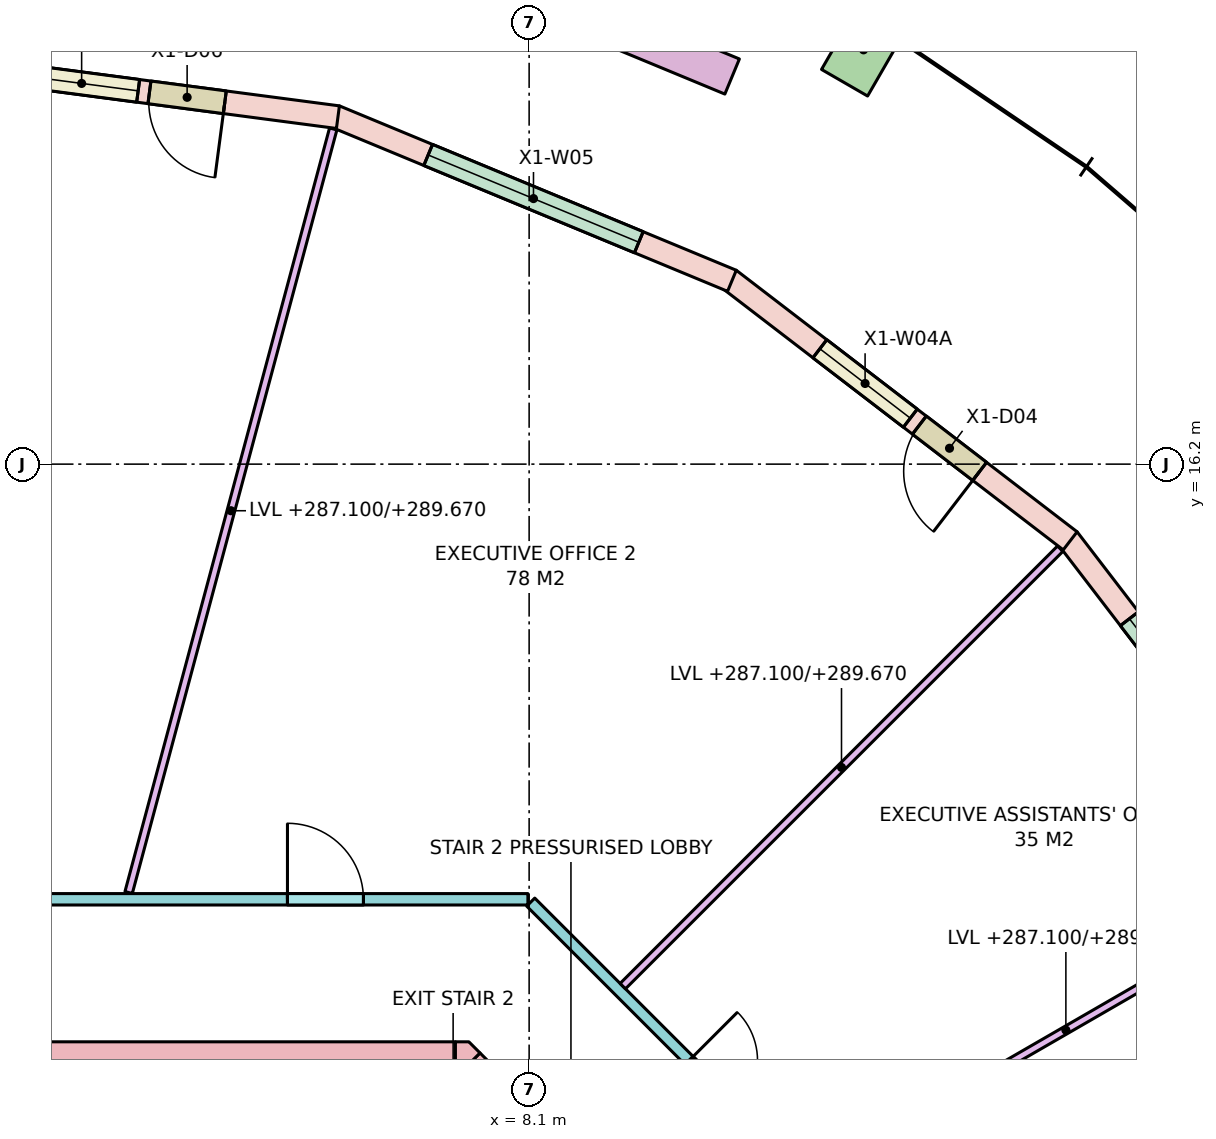
"""IFC4 building model, lengths in metres.
Left out: names, types, materials, properties, quantities, classifications, styles, units other than length and angle.
Written with IfcOpenShell. Run it as: python <this file> out.ifc"""

import sys

from ifc_helpers import new_model, si_unit, direction, frame, frame_2d, origin, origin_2d, place, context, subcontext, project, spatial, polyline, rectangle, outline, extrude, element, fill, save


model = new_model("IFC4")
c1 = context("Model", 3, precision=1e-05, world=origin(), true_north=direction((0.0, 1.0)))
c2 = subcontext(c1, "Body", "Model", "MODEL_VIEW")
j1 = project(units=[si_unit("LENGTHUNIT", "METRE"), si_unit("PLANEANGLEUNIT", "RADIAN")], contexts=[c1])
p1 = place(None, origin())
s1 = spatial("IfcSite", under=j1, at=p1, CompositionType="ELEMENT")
p2 = place(p1, origin())
s2 = spatial("IfcBuilding", under=s1, at=p2, CompositionType="ELEMENT")
p3 = place(p2, frame((0.0, 0.0, 287.1)))
s3 = spatial("IfcBuildingStorey", under=s2, at=p3, CompositionType="ELEMENT", Elevation=287.1)
p4 = place(p3, frame((12.5, 21.651, 0.0), z_axis=(0.0, 0.0, 1.0), x_axis=(-0.866025403784, 0.5, 0.0)))
e1 = element("IfcColumn", 1, at=p4, inside=s3, PredefinedType="COLUMN", context=c2, shape_type="SweptSolid", body=[
    extrude(rectangle(XDim=0.7, YDim=1.0, at=origin_2d()), origin(), (0.0, 0.0, 1.0), 3.7),
])
p5 = place(p3, frame((-7.13, 8.35, -0.28), z_axis=(0.0, 0.0, 1.0), x_axis=(1.0, 0.0, 0.0)))
e2 = element("IfcWall", 2, at=p5, inside=s3, PredefinedType="SHEAR", context=c2, shape_type="SweptSolid", body=[
    extrude(rectangle(XDim=14.26, YDim=0.5, at=frame_2d((7.13, 0.0))), origin(), (0.0, 0.0, 1.0), 3.7),
])
p6 = place(p5, frame((5.48, 0.0, 0.28)))
e3 = element("IfcOpeningElement", 3, at=p6, cuts=e2, PredefinedType="OPENING", context=c2, shape_type="SweptSolid", body=[
    extrude(rectangle(XDim=0.7, YDim=2.1, at=frame_2d((0.35, 1.05))), frame((0.0, 0.26, 0.0), z_axis=(0.0, -1.0, 0.0), x_axis=(1.0, 0.0, 0.0)), (0.0, 0.0, 1.0), 0.52),
])
p7 = place(p5, frame((7.155, 0.0, 0.28)))
e4 = element("IfcOpeningElement", 4, at=p7, cuts=e2, PredefinedType="OPENING", context=c2, shape_type="SweptSolid", body=[
    extrude(rectangle(XDim=0.9, YDim=2.1, at=frame_2d((0.45, 1.05))), frame((0.0, 0.26, 0.0), z_axis=(0.0, -1.0, 0.0), x_axis=(1.0, 0.0, 0.0)), (0.0, 0.0, 1.0), 0.52),
])
p8 = place(p3, frame((7.277, 8.277, -0.28), z_axis=(0.0, 0.0, 1.0), x_axis=(0.707106781187, -0.707106781187, 0.0)))
e5 = element("IfcWall", 5, at=p8, inside=s3, PredefinedType="SHEAR", context=c2, shape_type="SweptSolid", body=[
    extrude(rectangle(XDim=4.243, YDim=0.5, at=frame_2d((2.121, 0.0))), origin(), (0.0, 0.0, 1.0), 3.7),
])
p9 = place(p8, frame((2.393, 0.0, 0.28)))
e6 = element("IfcOpeningElement", 6, at=p9, cuts=e5, PredefinedType="OPENING", context=c2, shape_type="SweptSolid", body=[
    extrude(rectangle(XDim=1.2, YDim=2.1, at=frame_2d((0.6, 1.05))), frame((0.0, 0.26, 0.0), z_axis=(0.0, -1.0, 0.0), x_axis=(1.0, 0.0, 0.0)), (0.0, 0.0, 1.0), 0.52),
])
p10 = place(p3, frame((0.0, 0.0, -0.28)))
e7 = element("IfcWall", 7, at=p10, inside=s3, PredefinedType="SHEAR", context=c2, shape_type="SweptSolid", body=[
    extrude(outline(polyline([(7.307, 8.6), (7.454, 8.454), (7.13, 8.13), (7.13, 8.6), (7.307, 8.6)])), origin(), (0.0, 0.0, 1.0), 3.7),
])
p11 = place(p3, frame((18.632, 10.734, 0.0), z_axis=(0.0, 0.0, 1.0), x_axis=(-0.608747976925, 0.793363662257, 0.0)))
e8 = element("IfcWall", 8, at=p11, inside=s3, PredefinedType="STANDARD", context=c2, shape_type="SweptSolid", body=[
    extrude(rectangle(XDim=5.652, YDim=0.3, at=frame_2d((2.826, 0.0))), origin(), (0.0, 0.0, 1.0), 3.42),
])
p12 = place(p11, frame((1.326, 0.0, 0.8)))
e9 = element("IfcOpeningElement", 9, at=p12, cuts=e8, PredefinedType="OPENING", context=c2, shape_type="SweptSolid", body=[
    extrude(rectangle(XDim=3.0, YDim=2.4, at=frame_2d((1.5, 1.2))), frame((0.0, 0.16, 0.0), z_axis=(0.0, -1.0, 0.0), x_axis=(1.0, 0.0, 0.0)), (0.0, 0.0, 1.0), 0.32),
])
p13 = place(p3, frame((15.219, 15.191, 0.0), z_axis=(0.0, 0.0, 1.0), x_axis=(-0.793363662257, 0.608747976925, 0.0)))
e10 = element("IfcWall", 10, at=p13, inside=s3, PredefinedType="STANDARD", context=c2, shape_type="SweptSolid", body=[
    extrude(rectangle(XDim=5.652, YDim=0.3, at=frame_2d((2.826, 0.0))), origin(), (0.0, 0.0, 1.0), 3.42),
])
p14 = place(p13, frame((1.501, 0.0, 0.0)))
e11 = element("IfcOpeningElement", 11, at=p14, cuts=e10, PredefinedType="OPENING", context=c2, shape_type="SweptSolid", body=[
    extrude(rectangle(XDim=1.0, YDim=2.4, at=frame_2d((0.5, 1.2))), frame((0.0, 0.16, 0.0), z_axis=(0.0, -1.0, 0.0), x_axis=(1.0, 0.0, 0.0)), (0.0, 0.0, 1.0), 0.32),
])
p15 = place(p13, frame((2.651, 0.0, 0.8)))
e12 = element("IfcOpeningElement", 12, at=p15, cuts=e10, PredefinedType="OPENING", context=c2, shape_type="SweptSolid", body=[
    extrude(rectangle(XDim=1.5, YDim=2.4, at=frame_2d((0.75, 1.2))), frame((0.0, 0.16, 0.0), z_axis=(0.0, -1.0, 0.0), x_axis=(1.0, 0.0, 0.0)), (0.0, 0.0, 1.0), 0.32),
])
p16 = place(p3, frame((10.768, 18.612, 0.0), z_axis=(0.0, 0.0, 1.0), x_axis=(-0.923888907244, 0.382660798975, 0.0)))
e13 = element("IfcWall", 13, at=p16, inside=s3, PredefinedType="STANDARD", context=c2, shape_type="SweptSolid", body=[
    extrude(rectangle(XDim=5.652, YDim=0.3, at=frame_2d((2.826, 0.0))), origin(), (0.0, 0.0, 1.0), 3.42),
])
p17 = place(p16, frame((1.326, 0.0, 0.8)))
e14 = element("IfcOpeningElement", 14, at=p17, cuts=e13, PredefinedType="OPENING", context=c2, shape_type="SweptSolid", body=[
    extrude(rectangle(XDim=3.0, YDim=2.4, at=frame_2d((1.5, 1.2))), frame((0.0, 0.16, 0.0), z_axis=(0.0, -1.0, 0.0), x_axis=(1.0, 0.0, 0.0)), (0.0, 0.0, 1.0), 0.32),
])
p18 = place(p3, frame((5.584, 20.765, 0.0), z_axis=(0.0, 0.0, 1.0), x_axis=(-0.991443853938, 0.130533844229, 0.0)))
e15 = element("IfcWall", 15, at=p18, inside=s3, PredefinedType="STANDARD", context=c2, shape_type="SweptSolid", body=[
    extrude(rectangle(XDim=5.652, YDim=0.3, at=frame_2d((2.826, 0.0))), origin(), (0.0, 0.0, 1.0), 3.42),
])
p19 = place(p18, frame((1.501, 0.0, 0.0)))
e16 = element("IfcOpeningElement", 16, at=p19, cuts=e15, PredefinedType="OPENING", context=c2, shape_type="SweptSolid", body=[
    extrude(rectangle(XDim=1.0, YDim=2.4, at=frame_2d((0.5, 1.2))), frame((0.0, 0.16, 0.0), z_axis=(0.0, -1.0, 0.0), x_axis=(1.0, 0.0, 0.0)), (0.0, 0.0, 1.0), 0.32),
])
p20 = place(p18, frame((2.651, 0.0, 0.8)))
e17 = element("IfcOpeningElement", 17, at=p20, cuts=e15, PredefinedType="OPENING", context=c2, shape_type="SweptSolid", body=[
    extrude(rectangle(XDim=1.5, YDim=2.4, at=frame_2d((0.75, 1.2))), frame((0.0, 0.16, 0.0), z_axis=(0.0, -1.0, 0.0), x_axis=(1.0, 0.0, 0.0)), (0.0, 0.0, 1.0), 0.32),
])
p21 = place(p3, frame((10.771, 21.3, 0.0), z_axis=(0.0, 0.0, 1.0), x_axis=(-0.923875488976, 0.382693194178, 0.0)))
e18 = element("IfcWall", 18, at=p21, inside=s3, PredefinedType="PARAPET", context=c2, shape_type="SweptSolid", body=[
    extrude(rectangle(XDim=3.6, YDim=0.5, at=frame_2d((1.8, 0.0))), origin(), (0.0, 0.0, 1.0), 0.9),
])
p22 = place(p3, frame((-8.084, 10.475, 0.0), z_axis=(0.0, 0.0, 1.0), x_axis=(1.0, 0.0, 0.0)))
e19 = element("IfcWall", 19, at=p22, inside=s3, PredefinedType="PARTITIONING", context=c2, shape_type="SweptSolid", body=[
    extrude(rectangle(XDim=16.167, YDim=0.15, at=frame_2d((8.084, 0.0))), origin(), (0.0, 0.0, 1.0), 2.57),
])
p23 = place(p22, frame((13.004, 0.0, 0.0)))
e20 = element("IfcOpeningElement", 20, at=p23, cuts=e19, PredefinedType="OPENING", context=c2, shape_type="SweptSolid", body=[
    extrude(rectangle(XDim=1.0, YDim=2.1, at=frame_2d((0.5, 1.05))), frame((0.0, 0.085, 0.0), z_axis=(0.0, -1.0, 0.0), x_axis=(1.0, 0.0, 0.0)), (0.0, 0.0, 1.0), 0.17),
])
p24 = place(p22, frame((7.184, 0.0, 0.0)))
e21 = element("IfcOpeningElement", 21, at=p24, cuts=e19, PredefinedType="OPENING", context=c2, shape_type="SweptSolid", body=[
    extrude(rectangle(XDim=1.8, YDim=2.1, at=frame_2d((0.9, 1.05))), frame((0.0, 0.085, 0.0), z_axis=(0.0, -1.0, 0.0), x_axis=(1.0, 0.0, 0.0)), (0.0, 0.0, 1.0), 0.17),
])
p25 = place(p22, frame((3.153, 0.0, 0.0)))
e22 = element("IfcOpeningElement", 22, at=p25, cuts=e19, PredefinedType="OPENING", context=c2, shape_type="SweptSolid", body=[
    extrude(rectangle(XDim=1.0, YDim=2.1, at=frame_2d((0.5, 1.05))), frame((0.0, 0.085, 0.0), z_axis=(0.0, -1.0, 0.0), x_axis=(1.0, 0.0, 0.0)), (0.0, 0.0, 1.0), 0.17),
])
p26 = place(p3, frame((8.121, 10.438, 0.0), z_axis=(0.0, 0.0, 1.0), x_axis=(0.707106781187, -0.707106781187, 0.0)))
e23 = element("IfcWall", 23, at=p26, inside=s3, PredefinedType="PARTITIONING", context=c2, shape_type="SweptSolid", body=[
    extrude(rectangle(XDim=6.105, YDim=0.15, at=frame_2d((3.053, 0.0))), origin(), (0.0, 0.0, 1.0), 2.57),
])
p27 = place(p26, frame((2.948, 0.0, 0.0)))
e24 = element("IfcOpeningElement", 24, at=p27, cuts=e23, PredefinedType="OPENING", context=c2, shape_type="SweptSolid", body=[
    extrude(rectangle(XDim=0.9, YDim=2.1, at=frame_2d((0.45, 1.05))), frame((0.0, 0.085, 0.0), z_axis=(0.0, -1.0, 0.0), x_axis=(1.0, 0.0, 0.0)), (0.0, 0.0, 1.0), 0.17),
])
p28 = place(p3, frame((11.846, 6.839, 0.0), z_axis=(0.0, 0.0, 1.0), x_axis=(0.866007734672, 0.500030602552, 0.0)))
e25 = element("IfcWall", 25, at=p28, inside=s3, PredefinedType="PARTITIONING", context=c2, shape_type="SweptSolid", body=[
    extrude(rectangle(XDim=7.658, YDim=0.1, at=frame_2d((3.829, 0.0))), origin(), (0.0, 0.0, 1.0), 2.62),
])
p29 = place(p3, frame((9.333, 9.333, 0.0), z_axis=(0.0, 0.0, 1.0), x_axis=(0.707106781187, 0.707106781187, 0.0)))
e26 = element("IfcWall", 26, at=p29, inside=s3, PredefinedType="PARTITIONING", context=c2, shape_type="SweptSolid", body=[
    extrude(rectangle(XDim=8.139, YDim=0.1, at=frame_2d((4.069, 0.0))), origin(), (0.0, 0.0, 1.0), 2.57),
])
p30 = place(p3, frame((2.831, 10.564, 0.0), z_axis=(0.0, 0.0, 1.0), x_axis=(0.258796321138, 0.965931914871, 0.0)))
e27 = element("IfcWall", 27, at=p30, inside=s3, PredefinedType="PARTITIONING", context=c2, shape_type="SweptSolid", body=[
    extrude(rectangle(XDim=10.4, YDim=0.1, at=frame_2d((5.2, 0.0))), origin(), (0.0, 0.0, 1.0), 2.57),
])
p31 = place(p12, origin())
e28 = element("IfcWindow", 28, at=p31, inside=s3, PartitioningType="SINGLE_PANEL", PredefinedType="WINDOW", context=c2, shape_type="SweptSolid", body=[
    extrude(rectangle(XDim=3.0, YDim=2.4, at=frame_2d((1.5, 1.2))), frame((0.0, 0.03, 0.0), z_axis=(0.0, -1.0, 0.0), x_axis=(1.0, 0.0, 0.0)), (0.0, 0.0, 1.0), 0.06),
])
fill(e9, e28)
p32 = place(p14, origin())
e29 = element("IfcDoor", 29, at=p32, inside=s3, OperationType="SINGLE_SWING_LEFT", PredefinedType="DOOR", context=c2, shape_type="SweptSolid", body=[
    extrude(rectangle(XDim=1.0, YDim=2.4, at=frame_2d((0.5, 1.2))), frame((0.0, 0.025, 0.0), z_axis=(0.0, -1.0, 0.0), x_axis=(1.0, 0.0, 0.0)), (0.0, 0.0, 1.0), 0.05),
])
fill(e11, e29)
p33 = place(p15, origin())
e30 = element("IfcWindow", 30, at=p33, inside=s3, PartitioningType="SINGLE_PANEL", PredefinedType="WINDOW", context=c2, shape_type="SweptSolid", body=[
    extrude(rectangle(XDim=1.5, YDim=2.4, at=frame_2d((0.75, 1.2))), frame((0.0, 0.03, 0.0), z_axis=(0.0, -1.0, 0.0), x_axis=(1.0, 0.0, 0.0)), (0.0, 0.0, 1.0), 0.06),
])
fill(e12, e30)
p34 = place(p17, origin())
e31 = element("IfcWindow", 31, at=p34, inside=s3, PartitioningType="SINGLE_PANEL", PredefinedType="WINDOW", context=c2, shape_type="SweptSolid", body=[
    extrude(rectangle(XDim=3.0, YDim=2.4, at=frame_2d((1.5, 1.2))), frame((0.0, 0.03, 0.0), z_axis=(0.0, -1.0, 0.0), x_axis=(1.0, 0.0, 0.0)), (0.0, 0.0, 1.0), 0.06),
])
fill(e14, e31)
p35 = place(p19, origin())
e32 = element("IfcDoor", 32, at=p35, inside=s3, OperationType="SINGLE_SWING_LEFT", PredefinedType="DOOR", context=c2, shape_type="SweptSolid", body=[
    extrude(rectangle(XDim=1.0, YDim=2.4, at=frame_2d((0.5, 1.2))), frame((0.0, 0.025, 0.0), z_axis=(0.0, -1.0, 0.0), x_axis=(1.0, 0.0, 0.0)), (0.0, 0.0, 1.0), 0.05),
])
fill(e16, e32)
p36 = place(p20, origin())
e33 = element("IfcWindow", 33, at=p36, inside=s3, PartitioningType="SINGLE_PANEL", PredefinedType="WINDOW", context=c2, shape_type="SweptSolid", body=[
    extrude(rectangle(XDim=1.5, YDim=2.4, at=frame_2d((0.75, 1.2))), frame((0.0, 0.03, 0.0), z_axis=(0.0, -1.0, 0.0), x_axis=(1.0, 0.0, 0.0)), (0.0, 0.0, 1.0), 0.06),
])
fill(e17, e33)
p37 = place(p27, origin())
e34 = element("IfcDoor", 34, at=p37, inside=s3, OperationType="SINGLE_SWING_LEFT", PredefinedType="DOOR", context=c2, shape_type="SweptSolid", body=[
    extrude(rectangle(XDim=0.9, YDim=2.1, at=frame_2d((0.45, 1.05))), frame((0.0, 0.025, 0.0), z_axis=(0.0, -1.0, 0.0), x_axis=(1.0, 0.0, 0.0)), (0.0, 0.0, 1.0), 0.05),
])
fill(e24, e34)
p38 = place(p23, origin())
e35 = element("IfcDoor", 35, at=p38, inside=s3, OperationType="SINGLE_SWING_LEFT", PredefinedType="DOOR", context=c2, shape_type="SweptSolid", body=[
    extrude(rectangle(XDim=1.0, YDim=2.1, at=frame_2d((0.5, 1.05))), frame((0.0, 0.025, 0.0), z_axis=(0.0, -1.0, 0.0), x_axis=(1.0, 0.0, 0.0)), (0.0, 0.0, 1.0), 0.05),
])
fill(e20, e35)
save(model, sys.argv[1])
